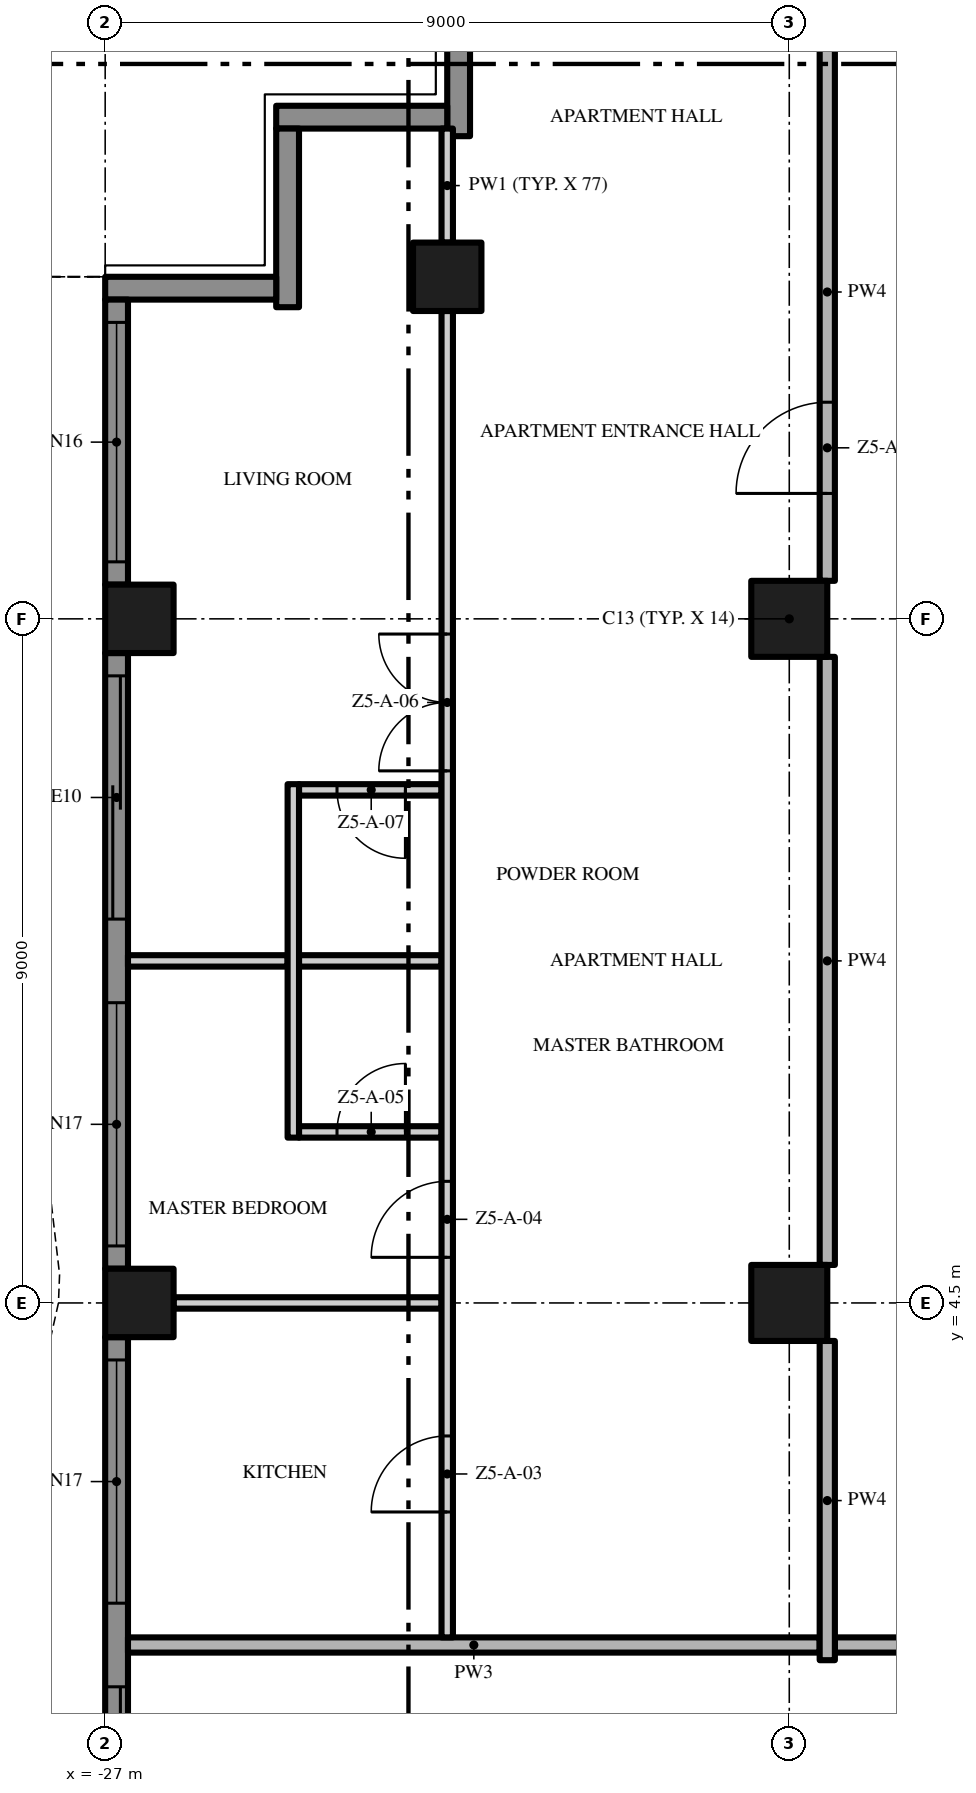
"""IFC4 building model, lengths in metres.
Left out: names, types, materials, properties, quantities, classifications, styles, units other than length and angle.
Written with IfcOpenShell. Run it as: python <this file> out.ifc"""

import sys

from ifc_helpers import new_model, si_unit, direction, frame, frame_2d, origin, origin_2d, place, context, subcontext, project, spatial, polyline, rectangle, outline, extrude, element, fill, save


model = new_model("IFC4")
c1 = context("Model", 3, precision=1e-05, world=origin(), true_north=direction((0.0, 1.0)))
c2 = subcontext(c1, "Body", "Model", "MODEL_VIEW")
j1 = project(units=[si_unit("LENGTHUNIT", "METRE"), si_unit("PLANEANGLEUNIT", "RADIAN")], contexts=[c1])
p1 = place(None, origin())
s1 = spatial("IfcSite", under=j1, at=p1, CompositionType="ELEMENT")
p2 = place(p1, origin())
s2 = spatial("IfcBuilding", under=s1, at=p2, CompositionType="ELEMENT")
p3 = place(p2, frame((0.0, 0.0, 238.8)))
s3 = spatial("IfcBuildingStorey", under=s2, at=p3, CompositionType="ELEMENT", Elevation=238.8)
for number, where, z_axis, x_axis in (
    (1, (-18.0, 13.5, 0.0), (0.0, 0.0, 1.0), (1.0, 0.0, 0.0)),
    (2, (-18.0, 4.5, 0.0), (0.0, 0.0, 1.0), (1.0, 0.0, 0.0)),
):
    element("IfcColumn", number, at=place(p3, frame(where, z_axis=z_axis, x_axis=x_axis)), inside=s3, PredefinedType="COLUMN", context=c2, shape_type="SweptSolid", body=[
        extrude(rectangle(XDim=1.0, YDim=1.0, at=origin_2d()), origin(), (0.0, 0.0, 1.0), 3.5),
    ])
for number, where, z_axis, x_axis in (
    (3, (-26.55, 13.5, 0.0), (0.0, 0.0, 1.0), (1.0, 0.0, 0.0)),
    (4, (-22.5, 18.0, 0.0), (0.0, 0.0, 1.0), (1.0, 0.0, 0.0)),
    (5, (-26.55, 4.5, 0.0), (0.0, 0.0, 1.0), (1.0, 0.0, 0.0)),
):
    element("IfcColumn", number, at=place(p3, frame(where, z_axis=z_axis, x_axis=x_axis)), inside=s3, PredefinedType="COLUMN", context=c2, shape_type="SweptSolid", body=[
        extrude(rectangle(XDim=0.9, YDim=0.9, at=origin_2d()), origin(), (0.0, 0.0, 1.0), 3.5),
    ])
p4 = place(p3, frame((-22.35, 19.85, 0.0), z_axis=(0.0, 0.0, 1.0), x_axis=(0.0, 1.0, 0.0)))
e6 = element("IfcWall", 6, at=p4, inside=s3, PredefinedType="SOLIDWALL", context=c2, shape_type="SweptSolid", body=[
    extrude(rectangle(XDim=2.35, YDim=0.3, at=frame_2d((1.175, 0.0))), origin(), (0.0, 0.0, 1.0), 3.5),
])
p5 = place(p3, frame((-24.75, 20.1, 0.0), z_axis=(0.0, 0.0, 1.0), x_axis=(1.0, 0.0, 0.0)))
e7 = element("IfcWall", 7, at=p5, inside=s3, PredefinedType="SOLIDWALL", context=c2, shape_type="SweptSolid", body=[
    extrude(rectangle(XDim=2.25, YDim=0.3, at=frame_2d((1.125, 0.0))), origin(), (0.0, 0.0, 1.0), 3.5),
])
p6 = place(p3, frame((-24.6, 17.6, 0.0), z_axis=(0.0, 0.0, 1.0), x_axis=(0.0, 1.0, 0.0)))
e8 = element("IfcWall", 8, at=p6, inside=s3, PredefinedType="SOLIDWALL", context=c2, shape_type="SweptSolid", body=[
    extrude(rectangle(XDim=2.35, YDim=0.3, at=frame_2d((1.175, 0.0))), origin(), (0.0, 0.0, 1.0), 3.5),
])
p7 = place(p3, frame((-27.0, 17.85, 0.0), z_axis=(0.0, 0.0, 1.0), x_axis=(1.0, 0.0, 0.0)))
e9 = element("IfcWall", 9, at=p7, inside=s3, PredefinedType="SOLIDWALL", context=c2, shape_type="SweptSolid", body=[
    extrude(rectangle(XDim=2.25, YDim=0.3, at=frame_2d((1.125, 0.0))), origin(), (0.0, 0.0, 1.0), 3.5),
])
p8 = place(p3, frame((-26.85, 13.95, 0.0), z_axis=(0.0, 0.0, 1.0), x_axis=(0.0, 1.0, 0.0)))
e10 = element("IfcWall", 10, at=p8, inside=s3, PredefinedType="SOLIDWALL", context=c2, shape_type="SweptSolid", body=[
    extrude(rectangle(XDim=3.75, YDim=0.3, at=frame_2d((1.875, 0.0))), origin(), (0.0, 0.0, 1.0), 3.5),
])
p9 = place(p8, frame((0.3, 0.0, 0.45)))
e11 = element("IfcOpeningElement", 11, at=p9, cuts=e10, PredefinedType="OPENING", context=c2, shape_type="SweptSolid", body=[
    extrude(rectangle(XDim=3.15, YDim=2.65, at=frame_2d((1.575, 1.325))), frame((0.0, 0.16, 0.0), z_axis=(0.0, -1.0, 0.0), x_axis=(1.0, 0.0, 0.0)), (0.0, 0.0, 1.0), 0.32),
])
p10 = place(p3, frame((-26.85, 4.95, 0.0), z_axis=(0.0, 0.0, 1.0), x_axis=(0.0, 1.0, 0.0)))
e12 = element("IfcWall", 12, at=p10, inside=s3, PredefinedType="SOLIDWALL", context=c2, shape_type="SweptSolid", body=[
    extrude(rectangle(XDim=8.1, YDim=0.3, at=frame_2d((4.05, 0.0))), origin(), (0.0, 0.0, 1.0), 3.5),
])
p11 = place(p10, frame((4.6, 0.0, 0.0)))
e13 = element("IfcOpeningElement", 13, at=p11, cuts=e12, PredefinedType="OPENING", context=c2, shape_type="SweptSolid", body=[
    extrude(rectangle(XDim=3.2, YDim=2.4, at=frame_2d((1.6, 1.2))), frame((0.0, 0.16, 0.0), z_axis=(0.0, -1.0, 0.0), x_axis=(1.0, 0.0, 0.0)), (0.0, 0.0, 1.0), 0.32),
])
p12 = place(p10, frame((0.3, 0.0, 0.45)))
e14 = element("IfcOpeningElement", 14, at=p12, cuts=e12, PredefinedType="OPENING", context=c2, shape_type="SweptSolid", body=[
    extrude(rectangle(XDim=3.2, YDim=2.65, at=frame_2d((1.6, 1.325))), frame((0.0, 0.16, 0.0), z_axis=(0.0, -1.0, 0.0), x_axis=(1.0, 0.0, 0.0)), (0.0, 0.0, 1.0), 0.32),
])
p13 = place(p3, frame((-26.85, -4.05, 0.0), z_axis=(0.0, 0.0, 1.0), x_axis=(0.0, 1.0, 0.0)))
e15 = element("IfcWall", 15, at=p13, inside=s3, PredefinedType="SOLIDWALL", context=c2, shape_type="SweptSolid", body=[
    extrude(rectangle(XDim=8.1, YDim=0.3, at=frame_2d((4.05, 0.0))), origin(), (0.0, 0.0, 1.0), 3.5),
])
p14 = place(p13, frame((4.6, 0.0, 0.45)))
e16 = element("IfcOpeningElement", 16, at=p14, cuts=e15, PredefinedType="OPENING", context=c2, shape_type="SweptSolid", body=[
    extrude(rectangle(XDim=3.2, YDim=2.65, at=frame_2d((1.6, 1.325))), frame((0.0, 0.16, 0.0), z_axis=(0.0, -1.0, 0.0), x_axis=(1.0, 0.0, 0.0)), (0.0, 0.0, 1.0), 0.32),
])
p15 = place(p13, frame((0.3, 0.0, 0.0)))
e17 = element("IfcOpeningElement", 17, at=p15, cuts=e15, PredefinedType="OPENING", context=c2, shape_type="SweptSolid", body=[
    extrude(rectangle(XDim=3.2, YDim=2.4, at=frame_2d((1.6, 1.2))), frame((0.0, 0.16, 0.0), z_axis=(0.0, -1.0, 0.0), x_axis=(1.0, 0.0, 0.0)), (0.0, 0.0, 1.0), 0.32),
])
p16 = place(p3, origin())
e18 = element("IfcWall", 18, at=p16, inside=s3, PredefinedType="USERDEFINED", context=c2, shape_type="SweptSolid", body=[
    extrude(outline(polyline([(-27.951, 18.0), (-28.612, 16.5), (-29.345, 15.0), (-29.869, 13.5), (-30.0, 12.375), (-29.985, 12.0), (-29.649, 10.5), (-28.988, 9.0), (-28.255, 7.5), (-27.731, 6.0), (-27.6, 4.875), (-27.615, 4.5), (-27.951, 3.0), (-28.612, 1.5), (-29.345, 0.0), (-29.869, -1.5), (-30.0, -2.625), (-29.985, -3.0), (-29.649, -4.5), (-28.988, -6.0), (-28.255, -7.5), (-27.731, -9.0), (-27.6, -10.125), (-27.615, -10.5), (-27.951, -12.0), (-28.612, -13.5), (-29.345, -15.0), (-29.869, -16.5), (-30.0, -17.625), (-29.985, -18.0), (-29.735, -17.99), (-29.749, -17.635), (-29.624, -16.556), (-29.114, -15.096), (-28.385, -13.605), (-27.713, -12.079), (-27.366, -10.533), (-27.349, -10.115), (-27.486, -8.944), (-28.024, -7.404), (-28.761, -5.895), (-29.41, -4.421), (-29.736, -2.967), (-29.749, -2.635), (-29.624, -1.556), (-29.114, -0.096), (-28.385, 1.395), (-27.713, 2.921), (-27.366, 4.467), (-27.349, 4.885), (-27.486, 6.056), (-28.024, 7.596), (-28.761, 9.105), (-29.41, 10.579), (-29.736, 12.033), (-29.749, 12.365), (-29.624, 13.444), (-29.114, 14.904), (-28.385, 16.395), (-27.723, 17.899), (-27.951, 18.0)])), origin(), (0.0, 0.0, 1.0), 0.9),
])
p17 = place(p3, frame((17.4, 0.0, 0.0), z_axis=(0.0, 0.0, 1.0), x_axis=(-1.0, 0.0, 0.0)))
e19 = element("IfcWall", 19, at=p17, inside=s3, PredefinedType="PARTITIONING", context=c2, shape_type="SweptSolid", body=[
    extrude(rectangle(XDim=34.8, YDim=0.2, at=frame_2d((17.4, 0.0))), origin(), (0.0, 0.0, 1.0), 3.5),
])
p18 = place(p17, frame((25.65, 0.0, 0.0)))
e20 = element("IfcOpeningElement", 20, at=p18, cuts=e19, PredefinedType="OPENING", context=c2, shape_type="SweptSolid", body=[
    extrude(rectangle(XDim=1.5, YDim=2.4, at=frame_2d((0.75, 1.2))), frame((0.0, 0.11, 0.0), z_axis=(0.0, -1.0, 0.0), x_axis=(1.0, 0.0, 0.0)), (0.0, 0.0, 1.0), 0.22),
])
p19 = place(p17, frame((7.65, 0.0, 0.0)))
e21 = element("IfcOpeningElement", 21, at=p19, cuts=e19, PredefinedType="OPENING", context=c2, shape_type="SweptSolid", body=[
    extrude(rectangle(XDim=1.5, YDim=2.4, at=frame_2d((0.75, 1.2))), frame((0.0, 0.11, 0.0), z_axis=(0.0, -1.0, 0.0), x_axis=(1.0, 0.0, 0.0)), (0.0, 0.0, 1.0), 0.22),
])
p20 = place(p3, frame((-26.7, 0.0, 0.0), z_axis=(0.0, 0.0, 1.0), x_axis=(1.0, 0.0, 0.0)))
e22 = element("IfcWall", 22, at=p20, inside=s3, PredefinedType="PARTITIONING", context=c2, shape_type="SweptSolid", body=[
    extrude(rectangle(XDim=9.1, YDim=0.2, at=frame_2d((4.55, 0.0))), origin(), (0.0, 0.0, 1.0), 3.5),
])
p21 = place(p3, frame((-26.1, 4.5, 0.0), z_axis=(0.0, 0.0, 1.0), x_axis=(1.0, 0.0, 0.0)))
e23 = element("IfcWall", 23, at=p21, inside=s3, PredefinedType="PARTITIONING", context=c2, shape_type="SweptSolid", body=[
    extrude(rectangle(XDim=3.525, YDim=0.15, at=frame_2d((1.762, 0.0))), origin(), (0.0, 0.0, 1.0), 3.5),
])
p22 = place(p3, frame((-24.45, 6.75, 0.0), z_axis=(0.0, 0.0, 1.0), x_axis=(1.0, 0.0, 0.0)))
e24 = element("IfcWall", 24, at=p22, inside=s3, PredefinedType="PARTITIONING", context=c2, shape_type="SweptSolid", body=[
    extrude(rectangle(XDim=1.875, YDim=0.15, at=frame_2d((0.938, 0.0))), origin(), (0.0, 0.0, 1.0), 3.5),
])
p23 = place(p22, frame((0.5, 0.0, 0.0)))
e25 = element("IfcOpeningElement", 25, at=p23, cuts=e24, PredefinedType="OPENING", context=c2, shape_type="SweptSolid", body=[
    extrude(rectangle(XDim=0.9, YDim=2.1, at=frame_2d((0.45, 1.05))), frame((0.0, 0.085, 0.0), z_axis=(0.0, -1.0, 0.0), x_axis=(1.0, 0.0, 0.0)), (0.0, 0.0, 1.0), 0.17),
])
p24 = place(p3, frame((-26.7, 9.0, 0.0), z_axis=(0.0, 0.0, 1.0), x_axis=(1.0, 0.0, 0.0)))
e26 = element("IfcWall", 26, at=p24, inside=s3, PredefinedType="PARTITIONING", context=c2, shape_type="SweptSolid", body=[
    extrude(rectangle(XDim=2.1, YDim=0.15, at=frame_2d((1.05, 0.0))), origin(), (0.0, 0.0, 1.0), 3.5),
])
p25 = place(p3, frame((-24.45, 9.0, 0.0), z_axis=(0.0, 0.0, 1.0), x_axis=(1.0, 0.0, 0.0)))
e27 = element("IfcWall", 27, at=p25, inside=s3, PredefinedType="PARTITIONING", context=c2, shape_type="SweptSolid", body=[
    extrude(rectangle(XDim=1.875, YDim=0.15, at=frame_2d((0.938, 0.0))), origin(), (0.0, 0.0, 1.0), 3.5),
])
p26 = place(p3, frame((-22.575, 11.25, 0.0), z_axis=(0.0, 0.0, 1.0), x_axis=(-1.0, 0.0, 0.0)))
e28 = element("IfcWall", 28, at=p26, inside=s3, PredefinedType="PARTITIONING", context=c2, shape_type="SweptSolid", body=[
    extrude(rectangle(XDim=1.875, YDim=0.15, at=frame_2d((0.938, 0.0))), origin(), (0.0, 0.0, 1.0), 3.5),
])
p27 = place(p26, frame((0.475, 0.0, 0.0)))
e29 = element("IfcOpeningElement", 29, at=p27, cuts=e28, PredefinedType="OPENING", context=c2, shape_type="SweptSolid", body=[
    extrude(rectangle(XDim=0.9, YDim=2.1, at=frame_2d((0.45, 1.05))), frame((0.0, 0.085, 0.0), z_axis=(0.0, -1.0, 0.0), x_axis=(1.0, 0.0, 0.0)), (0.0, 0.0, 1.0), 0.17),
])
p28 = place(p3, frame((-24.525, 6.675, 0.0), z_axis=(0.0, 0.0, 1.0), x_axis=(0.0, 1.0, 0.0)))
e30 = element("IfcWall", 30, at=p28, inside=s3, PredefinedType="PARTITIONING", context=c2, shape_type="SweptSolid", body=[
    extrude(rectangle(XDim=4.65, YDim=0.15, at=frame_2d((2.325, 0.0))), origin(), (0.0, 0.0, 1.0), 3.5),
])
p29 = place(p3, frame((-22.5, 0.1, 0.0), z_axis=(0.0, 0.0, 1.0), x_axis=(0.0, 1.0, 0.0)))
e31 = element("IfcWall", 31, at=p29, inside=s3, PredefinedType="PARTITIONING", context=c2, shape_type="SweptSolid", body=[
    extrude(rectangle(XDim=17.45, YDim=0.15, at=frame_2d((8.725, 0.0))), origin(), (0.0, 0.0, 1.0), 3.5),
])
p30 = place(p29, frame((1.65, 0.0, 0.0)))
e32 = element("IfcOpeningElement", 32, at=p30, cuts=e31, PredefinedType="OPENING", context=c2, shape_type="SweptSolid", body=[
    extrude(rectangle(XDim=1.0, YDim=2.4, at=frame_2d((0.5, 1.2))), frame((0.0, 0.085, 0.0), z_axis=(0.0, -1.0, 0.0), x_axis=(1.0, 0.0, 0.0)), (0.0, 0.0, 1.0), 0.17),
])
p31 = place(p29, frame((5.0, 0.0, 0.0)))
e33 = element("IfcOpeningElement", 33, at=p31, cuts=e31, PredefinedType="OPENING", context=c2, shape_type="SweptSolid", body=[
    extrude(rectangle(XDim=1.0, YDim=2.4, at=frame_2d((0.5, 1.2))), frame((0.0, 0.085, 0.0), z_axis=(0.0, -1.0, 0.0), x_axis=(1.0, 0.0, 0.0)), (0.0, 0.0, 1.0), 0.17),
])
p32 = place(p29, frame((11.4, 0.0, 0.0)))
e34 = element("IfcOpeningElement", 34, at=p32, cuts=e31, PredefinedType="OPENING", context=c2, shape_type="SweptSolid", body=[
    extrude(rectangle(XDim=1.8, YDim=2.4, at=frame_2d((0.9, 1.2))), frame((0.0, 0.085, 0.0), z_axis=(0.0, -1.0, 0.0), x_axis=(1.0, 0.0, 0.0)), (0.0, 0.0, 1.0), 0.17),
])
p33 = place(p3, frame((-22.5, 18.45, 0.0), z_axis=(0.0, 0.0, 1.0), x_axis=(0.0, 1.0, 0.0)))
e35 = element("IfcWall", 35, at=p33, inside=s3, PredefinedType="PARTITIONING", context=c2, shape_type="SweptSolid", body=[
    extrude(rectangle(XDim=1.5, YDim=0.15, at=frame_2d((0.75, 0.0))), origin(), (0.0, 0.0, 1.0), 3.5),
])
p34 = place(p3, frame((-17.5, -0.2, 0.0), z_axis=(0.0, 0.0, 1.0), x_axis=(0.0, 1.0, 0.0)))
e36 = element("IfcWall", 36, at=p34, inside=s3, PredefinedType="PARTITIONING", context=c2, shape_type="SweptSolid", body=[
    extrude(rectangle(XDim=4.2, YDim=0.2, at=frame_2d((2.1, 0.0))), origin(), (0.0, 0.0, 1.0), 3.5),
])
p35 = place(p3, frame((-17.5, 5.0, 0.0), z_axis=(0.0, 0.0, 1.0), x_axis=(0.0, 1.0, 0.0)))
e37 = element("IfcWall", 37, at=p35, inside=s3, PredefinedType="PARTITIONING", context=c2, shape_type="SweptSolid", body=[
    extrude(rectangle(XDim=8.0, YDim=0.2, at=frame_2d((4.0, 0.0))), origin(), (0.0, 0.0, 1.0), 3.5),
])
p36 = place(p3, frame((-17.5, 14.0, 0.0), z_axis=(0.0, 0.0, 1.0), x_axis=(0.0, 1.0, 0.0)))
e38 = element("IfcWall", 38, at=p36, inside=s3, PredefinedType="PARTITIONING", context=c2, shape_type="SweptSolid", body=[
    extrude(rectangle(XDim=7.6, YDim=0.2, at=frame_2d((3.8, 0.0))), origin(), (0.0, 0.0, 1.0), 3.5),
])
p37 = place(p36, frame((1.15, 0.0, 0.0)))
e39 = element("IfcOpeningElement", 39, at=p37, cuts=e38, PredefinedType="OPENING", context=c2, shape_type="SweptSolid", body=[
    extrude(rectangle(XDim=1.2, YDim=2.4, at=frame_2d((0.6, 1.2))), frame((0.0, 0.11, 0.0), z_axis=(0.0, -1.0, 0.0), x_axis=(1.0, 0.0, 0.0)), (0.0, 0.0, 1.0), 0.22),
])
p38 = place(p9, origin())
e40 = element("IfcWindow", 40, at=p38, inside=s3, PartitioningType="SINGLE_PANEL", PredefinedType="WINDOW", context=c2, shape_type="SweptSolid", body=[
    extrude(rectangle(XDim=3.15, YDim=2.65, at=frame_2d((1.575, 1.325))), frame((0.0, 0.03, 0.0), z_axis=(0.0, -1.0, 0.0), x_axis=(1.0, 0.0, 0.0)), (0.0, 0.0, 1.0), 0.06),
])
fill(e11, e40)
p39 = place(p11, origin())
e41 = element("IfcDoor", 41, at=p39, inside=s3, OperationType="SINGLE_SWING_LEFT", PredefinedType="DOOR", context=c2, shape_type="SweptSolid", body=[
    extrude(rectangle(XDim=3.2, YDim=2.4, at=frame_2d((1.6, 1.2))), frame((0.0, 0.025, 0.0), z_axis=(0.0, -1.0, 0.0), x_axis=(1.0, 0.0, 0.0)), (0.0, 0.0, 1.0), 0.05),
])
fill(e13, e41)
p40 = place(p12, origin())
e42 = element("IfcWindow", 42, at=p40, inside=s3, PartitioningType="SINGLE_PANEL", PredefinedType="WINDOW", context=c2, shape_type="SweptSolid", body=[
    extrude(rectangle(XDim=3.2, YDim=2.65, at=frame_2d((1.6, 1.325))), frame((0.0, 0.03, 0.0), z_axis=(0.0, -1.0, 0.0), x_axis=(1.0, 0.0, 0.0)), (0.0, 0.0, 1.0), 0.06),
])
fill(e14, e42)
p41 = place(p14, origin())
e43 = element("IfcWindow", 43, at=p41, inside=s3, PartitioningType="SINGLE_PANEL", PredefinedType="WINDOW", context=c2, shape_type="SweptSolid", body=[
    extrude(rectangle(XDim=3.2, YDim=2.65, at=frame_2d((1.6, 1.325))), frame((0.0, 0.03, 0.0), z_axis=(0.0, -1.0, 0.0), x_axis=(1.0, 0.0, 0.0)), (0.0, 0.0, 1.0), 0.06),
])
fill(e16, e43)
p42 = place(p15, origin())
e44 = element("IfcDoor", 44, at=p42, inside=s3, OperationType="SINGLE_SWING_LEFT", PredefinedType="DOOR", context=c2, shape_type="SweptSolid", body=[
    extrude(rectangle(XDim=3.2, YDim=2.4, at=frame_2d((1.6, 1.2))), frame((0.0, 0.025, 0.0), z_axis=(0.0, -1.0, 0.0), x_axis=(1.0, 0.0, 0.0)), (0.0, 0.0, 1.0), 0.05),
])
fill(e17, e44)
p43 = place(p37, origin())
e45 = element("IfcDoor", 45, at=p43, inside=s3, OperationType="SINGLE_SWING_LEFT", PredefinedType="DOOR", context=c2, shape_type="SweptSolid", body=[
    extrude(rectangle(XDim=1.2, YDim=2.4, at=frame_2d((0.6, 1.2))), frame((0.0, 0.025, 0.0), z_axis=(0.0, -1.0, 0.0), x_axis=(1.0, 0.0, 0.0)), (0.0, 0.0, 1.0), 0.05),
])
fill(e39, e45)
p44 = place(p30, origin())
e46 = element("IfcDoor", 46, at=p44, inside=s3, OperationType="SINGLE_SWING_LEFT", PredefinedType="DOOR", context=c2, shape_type="SweptSolid", body=[
    extrude(rectangle(XDim=1.0, YDim=2.4, at=frame_2d((0.5, 1.2))), frame((0.0, 0.025, 0.0), z_axis=(0.0, -1.0, 0.0), x_axis=(1.0, 0.0, 0.0)), (0.0, 0.0, 1.0), 0.05),
])
fill(e32, e46)
p45 = place(p31, origin())
e47 = element("IfcDoor", 47, at=p45, inside=s3, OperationType="SINGLE_SWING_LEFT", PredefinedType="DOOR", context=c2, shape_type="SweptSolid", body=[
    extrude(rectangle(XDim=1.0, YDim=2.4, at=frame_2d((0.5, 1.2))), frame((0.0, 0.025, 0.0), z_axis=(0.0, -1.0, 0.0), x_axis=(1.0, 0.0, 0.0)), (0.0, 0.0, 1.0), 0.05),
])
fill(e33, e47)
p46 = place(p23, origin())
e48 = element("IfcDoor", 48, at=p46, inside=s3, OperationType="SINGLE_SWING_RIGHT", PredefinedType="DOOR", context=c2, shape_type="SweptSolid", body=[
    extrude(rectangle(XDim=0.9, YDim=2.1, at=frame_2d((0.45, 1.05))), frame((0.0, 0.025, 0.0), z_axis=(0.0, -1.0, 0.0), x_axis=(1.0, 0.0, 0.0)), (0.0, 0.0, 1.0), 0.05),
])
fill(e25, e48)
p47 = place(p32, origin())
e49 = element("IfcDoor", 49, at=p47, inside=s3, OperationType="DOUBLE_DOOR_SINGLE_SWING", PredefinedType="DOOR", context=c2, shape_type="SweptSolid", body=[
    extrude(rectangle(XDim=1.8, YDim=2.4, at=frame_2d((0.9, 1.2))), frame((0.0, 0.025, 0.0), z_axis=(0.0, -1.0, 0.0), x_axis=(1.0, 0.0, 0.0)), (0.0, 0.0, 1.0), 0.05),
])
fill(e34, e49)
p48 = place(p27, origin())
e50 = element("IfcDoor", 50, at=p48, inside=s3, OperationType="SINGLE_SWING_LEFT", PredefinedType="DOOR", context=c2, shape_type="SweptSolid", body=[
    extrude(rectangle(XDim=0.9, YDim=2.1, at=frame_2d((0.45, 1.05))), frame((0.0, 0.025, 0.0), z_axis=(0.0, -1.0, 0.0), x_axis=(1.0, 0.0, 0.0)), (0.0, 0.0, 1.0), 0.05),
])
fill(e29, e50)
save(model, sys.argv[1])
